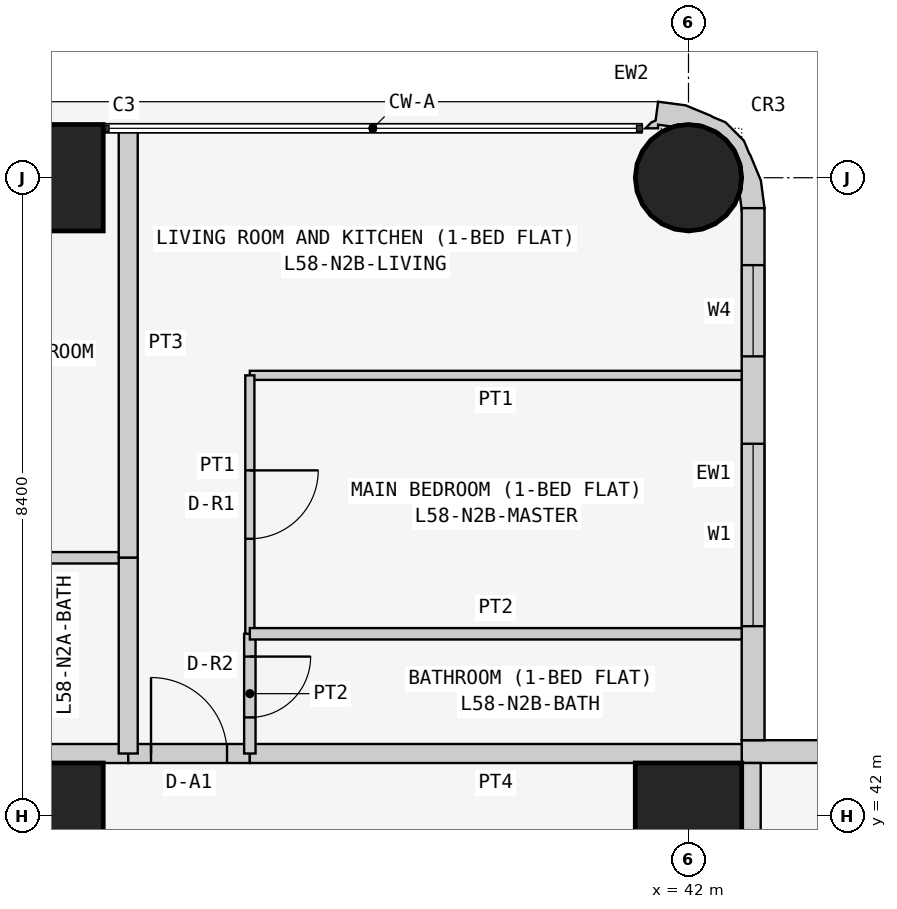
"""IFC4 building model, lengths in metres.
Left out: names, types, materials, properties, quantities, classifications, styles, units other than length and angle.
Written with IfcOpenShell. Run it as: python <this file> out.ifc"""

import sys

from ifc_helpers import new_model, si_unit, direction, frame, frame_2d, origin, origin_2d, place, context, subcontext, project, spatial, polyline, rectangle, circle, outline, extrude, element, fill, save


model = new_model("IFC4")
c1 = context("Model", 3, precision=1e-05, world=origin(), true_north=direction((0.0, 1.0)))
c2 = subcontext(c1, "Body", "Model", "MODEL_VIEW")
j1 = project(units=[si_unit("LENGTHUNIT", "METRE"), si_unit("PLANEANGLEUNIT", "RADIAN")], contexts=[c1])
p1 = place(None, origin())
s1 = spatial("IfcSite", under=j1, at=p1, CompositionType="ELEMENT")
p2 = place(p1, origin())
s2 = spatial("IfcBuilding", under=s1, at=p2, CompositionType="ELEMENT")
p3 = place(p2, frame((0.0, 0.0, 222.9)))
s3 = spatial("IfcBuildingStorey", under=s2, at=p3, CompositionType="ELEMENT", Elevation=222.9)
for number, where, z_axis, x_axis in (
    (1, (33.6, 42.0, 0.0), (0.0, 0.0, 1.0), (1.0, 0.0, 0.0)),
    (2, (33.6, 50.4, 0.0), (0.0, 0.0, 1.0), (1.0, 0.0, 0.0)),
    (3, (42.0, 42.0, 0.0), (0.0, 0.0, 1.0), (1.0, 0.0, 0.0)),
):
    element("IfcColumn", number, at=place(p3, frame(where, z_axis=z_axis, x_axis=x_axis)), inside=s3, PredefinedType="COLUMN", context=c2, shape_type="SweptSolid", body=[
        extrude(rectangle(XDim=1.4, YDim=1.4, at=origin_2d()), origin(), (0.0, 0.0, 1.0), 3.6),
    ])
p4 = place(p3, frame((42.0, 50.4, 0.0), z_axis=(0.0, 0.0, 1.0), x_axis=(1.0, 0.0, 0.0)))
e4 = element("IfcColumn", 4, at=p4, inside=s3, PredefinedType="COLUMN", context=c2, shape_type="SweptSolid", body=[
    extrude(circle(Radius=0.7, at=origin_2d()), origin(), (0.0, 0.0, 1.0), 3.6),
])
p5 = place(p3, frame((50.0, 42.85, 0.0), z_axis=(0.0, 0.0, 1.0), x_axis=(-1.0, 0.0, 0.0)))
e5 = element("IfcWall", 5, at=p5, inside=s3, PredefinedType="SOLIDWALL", context=c2, shape_type="SweptSolid", body=[
    extrude(rectangle(XDim=7.3, YDim=0.3, at=frame_2d((3.65, 0.0))), origin(), (0.0, 0.0, 1.0), 3.45),
])
p6 = place(p5, frame((3.1, 0.0, 0.9)))
e6 = element("IfcOpeningElement", 6, at=p6, cuts=e5, PredefinedType="OPENING", context=c2, shape_type="SweptSolid", body=[
    extrude(rectangle(XDim=2.4, YDim=1.5, at=frame_2d((1.2, 0.75))), frame((0.0, 0.16, 0.0), z_axis=(0.0, -1.0, 0.0), x_axis=(1.0, 0.0, 0.0)), (0.0, 0.0, 1.0), 0.32),
])
p7 = place(p5, frame((0.75, 0.0, 0.9)))
e7 = element("IfcOpeningElement", 7, at=p7, cuts=e5, PredefinedType="OPENING", context=c2, shape_type="SweptSolid", body=[
    extrude(rectangle(XDim=1.2, YDim=1.5, at=frame_2d((0.6, 0.75))), frame((0.0, 0.16, 0.0), z_axis=(0.0, -1.0, 0.0), x_axis=(1.0, 0.0, 0.0)), (0.0, 0.0, 1.0), 0.32),
])
p8 = place(p3, frame((42.85, 43.0, 0.0), z_axis=(0.0, 0.0, 1.0), x_axis=(0.0, 1.0, 0.0)))
e8 = element("IfcWall", 8, at=p8, inside=s3, PredefinedType="SOLIDWALL", context=c2, shape_type="SweptSolid", body=[
    extrude(rectangle(XDim=7.0, YDim=0.3, at=frame_2d((3.5, 0.0))), origin(), (0.0, 0.0, 1.0), 3.45),
])
p9 = place(p8, frame((1.5, 0.0, 0.9)))
e9 = element("IfcOpeningElement", 9, at=p9, cuts=e8, PredefinedType="OPENING", context=c2, shape_type="SweptSolid", body=[
    extrude(rectangle(XDim=2.4, YDim=1.5, at=frame_2d((1.2, 0.75))), frame((0.0, 0.16, 0.0), z_axis=(0.0, -1.0, 0.0), x_axis=(1.0, 0.0, 0.0)), (0.0, 0.0, 1.0), 0.32),
])
p10 = place(p8, frame((5.05, 0.0, 0.9)))
e10 = element("IfcOpeningElement", 10, at=p10, cuts=e8, PredefinedType="OPENING", context=c2, shape_type="SweptSolid", body=[
    extrude(rectangle(XDim=1.2, YDim=1.5, at=frame_2d((0.6, 0.75))), frame((0.0, 0.16, 0.0), z_axis=(0.0, -1.0, 0.0), x_axis=(1.0, 0.0, 0.0)), (0.0, 0.0, 1.0), 0.32),
])
p11 = place(p3, frame((42.724, 50.11, 0.0), z_axis=(0.0, 0.0, 1.0), x_axis=(0.439933741929, 0.898030234854, 0.0)))
e11 = element("IfcWall", 11, at=p11, inside=s3, PredefinedType="SOLIDWALL", context=c2, shape_type="SweptSolid", body=[
    extrude(outline(polyline([(-0.145, -0.044), (0.022, -0.296), (0.327, -0.094), (0.568, 0.18), (0.577, 0.199), (0.7, 0.337), (0.811, 0.661), (0.799, 0.845), (0.803, 0.866), (0.78, 1.231), (0.664, 1.577), (0.426, 1.497), (0.382, 1.536), (0.276, 1.572), (0.349, 1.423), (0.392, 1.444), (0.453, 1.261), (0.51, 1.211), (0.632, 0.961), (0.65, 0.683), (0.56, 0.419), (0.375, 0.21), (0.125, 0.087), (0.05, 0.082), (-0.127, -0.035), (-0.145, -0.044)])), origin(), (0.0, 0.0, 1.0), 3.45),
])
p12 = place(p3, frame((32.0, 42.825, 0.0), z_axis=(0.0, 0.0, 1.0), x_axis=(1.0, 0.0, 0.0)))
e12 = element("IfcWall", 12, at=p12, inside=s3, PredefinedType="PARTITIONING", context=c2, shape_type="SweptSolid", body=[
    extrude(rectangle(XDim=2.629, YDim=0.25, at=frame_2d((1.314, 0.0))), origin(), (0.0, 0.0, 1.0), 3.45),
])
p13 = place(p3, frame((34.629, 42.825, 0.0), z_axis=(0.0, 0.0, 1.0), x_axis=(1.0, 0.0, 0.0)))
e13 = element("IfcWall", 13, at=p13, inside=s3, PredefinedType="PARTITIONING", context=c2, shape_type="SweptSolid", body=[
    extrude(rectangle(XDim=1.6, YDim=0.25, at=frame_2d((0.8, 0.0))), origin(), (0.0, 0.0, 1.0), 3.45),
])
p14 = place(p13, frame((0.3, 0.0, 0.0)))
e14 = element("IfcOpeningElement", 14, at=p14, cuts=e13, PredefinedType="OPENING", context=c2, shape_type="SweptSolid", body=[
    extrude(rectangle(XDim=1.0, YDim=2.1, at=frame_2d((0.5, 1.05))), frame((0.0, 0.135, 0.0), z_axis=(0.0, -1.0, 0.0), x_axis=(1.0, 0.0, 0.0)), (0.0, 0.0, 1.0), 0.27),
])
p15 = place(p3, frame((36.229, 42.825, 0.0), z_axis=(0.0, 0.0, 1.0), x_axis=(1.0, 0.0, 0.0)))
e15 = element("IfcWall", 15, at=p15, inside=s3, PredefinedType="PARTITIONING", context=c2, shape_type="SweptSolid", body=[
    extrude(rectangle(XDim=6.471, YDim=0.25, at=frame_2d((3.235, 0.0))), origin(), (0.0, 0.0, 1.0), 3.45),
])
p16 = place(p3, frame((42.825, 42.7, 0.0), z_axis=(0.0, 0.0, 1.0), x_axis=(0.0, -1.0, 0.0)))
e16 = element("IfcWall", 16, at=p16, inside=s3, PredefinedType="PARTITIONING", context=c2, shape_type="SweptSolid", body=[
    extrude(rectangle(XDim=6.871, YDim=0.25, at=frame_2d((3.436, 0.0))), origin(), (0.0, 0.0, 1.0), 3.45),
])
p17 = place(p3, frame((34.629, 45.4, 0.0), z_axis=(0.0, 0.0, 1.0), x_axis=(-1.0, 0.0, 0.0)))
e17 = element("IfcWall", 17, at=p17, inside=s3, PredefinedType="PARTITIONING", context=c2, shape_type="SweptSolid", body=[
    extrude(rectangle(XDim=2.629, YDim=0.15, at=frame_2d((1.314, 0.0))), origin(), (0.0, 0.0, 1.0), 3.45),
])
p18 = place(p3, frame((34.629, 51.05, 0.0), z_axis=(0.0, 0.0, 1.0), x_axis=(0.0, -1.0, 0.0)))
e18 = element("IfcWall", 18, at=p18, inside=s3, PredefinedType="PARTITIONING", context=c2, shape_type="SweptSolid", body=[
    extrude(rectangle(XDim=5.65, YDim=0.25, at=frame_2d((2.825, 0.0))), origin(), (0.0, 0.0, 1.0), 3.45),
])
p19 = place(p3, frame((34.629, 45.4, 0.0), z_axis=(0.0, 0.0, 1.0), x_axis=(0.0, -1.0, 0.0)))
e19 = element("IfcWall", 19, at=p19, inside=s3, PredefinedType="PARTITIONING", context=c2, shape_type="SweptSolid", body=[
    extrude(rectangle(XDim=2.575, YDim=0.25, at=frame_2d((1.288, 0.0))), origin(), (0.0, 0.0, 1.0), 3.45),
])
p20 = place(p3, frame((36.229, 44.4, 0.0), z_axis=(0.0, 0.0, 1.0), x_axis=(0.0, -1.0, 0.0)))
e20 = element("IfcWall", 20, at=p20, inside=s3, PredefinedType="PARTITIONING", context=c2, shape_type="SweptSolid", body=[
    extrude(rectangle(XDim=1.575, YDim=0.15, at=frame_2d((0.788, 0.0))), origin(), (0.0, 0.0, 1.0), 3.45),
])
p21 = place(p20, frame((0.3, 0.0, 0.0)))
e21 = element("IfcOpeningElement", 21, at=p21, cuts=e20, PredefinedType="OPENING", context=c2, shape_type="SweptSolid", body=[
    extrude(rectangle(XDim=0.8, YDim=2.1, at=frame_2d((0.4, 1.05))), frame((0.0, 0.085, 0.0), z_axis=(0.0, -1.0, 0.0), x_axis=(1.0, 0.0, 0.0)), (0.0, 0.0, 1.0), 0.17),
])
p22 = place(p3, frame((42.7, 47.8, 0.0), z_axis=(0.0, 0.0, 1.0), x_axis=(-1.0, 0.0, 0.0)))
e22 = element("IfcWall", 22, at=p22, inside=s3, PredefinedType="PARTITIONING", context=c2, shape_type="SweptSolid", body=[
    extrude(rectangle(XDim=6.471, YDim=0.12, at=frame_2d((3.235, 0.0))), origin(), (0.0, 0.0, 1.0), 3.45),
])
p23 = place(p3, frame((36.229, 47.8, 0.0), z_axis=(0.0, 0.0, 1.0), x_axis=(0.0, -1.0, 0.0)))
e23 = element("IfcWall", 23, at=p23, inside=s3, PredefinedType="PARTITIONING", context=c2, shape_type="SweptSolid", body=[
    extrude(rectangle(XDim=3.4, YDim=0.12, at=frame_2d((1.7, 0.0))), origin(), (0.0, 0.0, 1.0), 3.45),
])
p24 = place(p23, frame((1.25, 0.0, 0.0)))
e24 = element("IfcOpeningElement", 24, at=p24, cuts=e23, PredefinedType="OPENING", context=c2, shape_type="SweptSolid", body=[
    extrude(rectangle(XDim=0.9, YDim=2.1, at=frame_2d((0.45, 1.05))), frame((0.0, 0.07, 0.0), z_axis=(0.0, -1.0, 0.0), x_axis=(1.0, 0.0, 0.0)), (0.0, 0.0, 1.0), 0.14),
])
p25 = place(p3, frame((36.229, 44.4, 0.0), z_axis=(0.0, 0.0, 1.0), x_axis=(1.0, 0.0, 0.0)))
e25 = element("IfcWall", 25, at=p25, inside=s3, PredefinedType="PARTITIONING", context=c2, shape_type="SweptSolid", body=[
    extrude(rectangle(XDim=6.471, YDim=0.15, at=frame_2d((3.235, 0.0))), origin(), (0.0, 0.0, 1.0), 3.45),
])
p26 = place(p9, origin())
e26 = element("IfcWindow", 26, at=p26, inside=s3, PartitioningType="SINGLE_PANEL", PredefinedType="WINDOW", context=c2, shape_type="SweptSolid", body=[
    extrude(rectangle(XDim=2.4, YDim=1.5, at=frame_2d((1.2, 0.75))), frame((0.0, 0.03, 0.0), z_axis=(0.0, -1.0, 0.0), x_axis=(1.0, 0.0, 0.0)), (0.0, 0.0, 1.0), 0.06),
])
fill(e9, e26)
p27 = place(p10, origin())
e27 = element("IfcWindow", 27, at=p27, inside=s3, PartitioningType="SINGLE_PANEL", PredefinedType="WINDOW", context=c2, shape_type="SweptSolid", body=[
    extrude(rectangle(XDim=1.2, YDim=1.5, at=frame_2d((0.6, 0.75))), frame((0.0, 0.03, 0.0), z_axis=(0.0, -1.0, 0.0), x_axis=(1.0, 0.0, 0.0)), (0.0, 0.0, 1.0), 0.06),
])
fill(e10, e27)
p28 = place(p14, origin())
e28 = element("IfcDoor", 28, at=p28, inside=s3, OperationType="SINGLE_SWING_LEFT", PredefinedType="DOOR", context=c2, shape_type="SweptSolid", body=[
    extrude(rectangle(XDim=1.0, YDim=2.1, at=frame_2d((0.5, 1.05))), frame((0.0, 0.025, 0.0), z_axis=(0.0, -1.0, 0.0), x_axis=(1.0, 0.0, 0.0)), (0.0, 0.0, 1.0), 0.05),
])
fill(e14, e28)
p29 = place(p21, origin())
e29 = element("IfcDoor", 29, at=p29, inside=s3, OperationType="SINGLE_SWING_LEFT", PredefinedType="DOOR", context=c2, shape_type="SweptSolid", body=[
    extrude(rectangle(XDim=0.8, YDim=2.1, at=frame_2d((0.4, 1.05))), frame((0.0, 0.025, 0.0), z_axis=(0.0, -1.0, 0.0), x_axis=(1.0, 0.0, 0.0)), (0.0, 0.0, 1.0), 0.05),
])
fill(e21, e29)
p30 = place(p24, origin())
e30 = element("IfcDoor", 30, at=p30, inside=s3, OperationType="SINGLE_SWING_LEFT", PredefinedType="DOOR", context=c2, shape_type="SweptSolid", body=[
    extrude(rectangle(XDim=0.9, YDim=2.1, at=frame_2d((0.45, 1.05))), frame((0.0, 0.025, 0.0), z_axis=(0.0, -1.0, 0.0), x_axis=(1.0, 0.0, 0.0)), (0.0, 0.0, 1.0), 0.05),
])
fill(e24, e30)
save(model, sys.argv[1])
